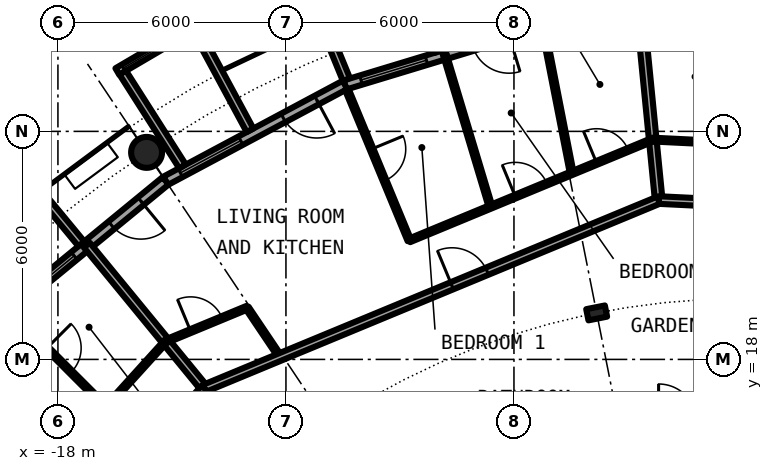
"""IFC4 building model, lengths in metres.
Left out: names, types, materials, properties, quantities, classifications, styles, units other than length and angle.
Written with IfcOpenShell. Run it as: python <this file> out.ifc"""

import sys

from ifc_helpers import new_model, si_unit, direction, frame, frame_2d, origin, origin_2d, place, context, subcontext, project, spatial, rectangle, circle, hollow_circle, i_section, extrude, element, fill, save


model = new_model("IFC4")
c1 = context("Model", 3, precision=1e-05, world=origin(), true_north=direction((0.0, 1.0)))
c2 = subcontext(c1, "Body", "Model", "MODEL_VIEW")
j1 = project(units=[si_unit("LENGTHUNIT", "METRE"), si_unit("PLANEANGLEUNIT", "RADIAN")], contexts=[c1])
p1 = place(None, origin())
s1 = spatial("IfcSite", under=j1, at=p1, CompositionType="ELEMENT")
p2 = place(p1, origin())
s2 = spatial("IfcBuilding", under=s1, at=p2, CompositionType="ELEMENT")
p3 = place(p2, frame((0.0, 0.0, 173.8)))
s3 = spatial("IfcBuildingStorey", under=s2, at=p3, CompositionType="ELEMENT", Elevation=173.8)
p4 = place(p3, frame((-15.667, 23.448, 0.0), z_axis=(0.0, 0.0, 1.0), x_axis=(1.0, 0.0, 0.0)))
e1 = element("IfcColumn", 1, at=p4, inside=s3, PredefinedType="COLUMN", context=c2, shape_type="SweptSolid", body=[
    extrude(hollow_circle(Radius=0.406, WallThickness=0.04, at=origin_2d()), origin(), (0.0, 0.0, 1.0), 3.05),
])
p5 = place(p3, frame((-3.824, 19.223, 0.0), z_axis=(0.0, 0.0, 1.0), x_axis=(-0.195090322016, 0.980785280403, 0.0)))
e2 = element("IfcColumn", 2, at=p5, inside=s3, PredefinedType="COLUMN", context=c2, shape_type="SweptSolid", body=[
    extrude(i_section(OverallWidth=0.3, OverallDepth=0.5, WebThickness=0.014, FlangeThickness=0.028, FilletRadius=0.027, at=origin_2d()), origin(), (0.0, 0.0, 1.0), 3.05),
])
p6 = place(p3, frame((-5.326, 26.775, 0.0), z_axis=(0.0, 0.0, 1.0), x_axis=(-0.956965678721, -0.290201119486, 0.0)))
e3 = element("IfcWall", 3, at=p6, inside=s3, PredefinedType="SOLIDWALL", context=c2, shape_type="SweptSolid", body=[
    extrude(rectangle(XDim=5.351, YDim=0.25, at=frame_2d((2.676, 0.0))), origin(), (0.0, 0.0, 1.0), 2.7),
])
p7 = place(p6, frame((0.841, 0.0, 0.0)))
e4 = element("IfcOpeningElement", 4, at=p7, cuts=e3, PredefinedType="OPENING", context=c2, shape_type="SweptSolid", body=[
    extrude(rectangle(XDim=1.0, YDim=2.2, at=frame_2d((0.5, 1.1))), frame((0.0, 0.135, 0.0), z_axis=(0.0, -1.0, 0.0), x_axis=(1.0, 0.0, 0.0)), (0.0, 0.0, 1.0), 0.27),
])
p8 = place(p6, frame((3.111, 0.0, 0.3)))
e5 = element("IfcOpeningElement", 5, at=p8, cuts=e3, PredefinedType="OPENING", context=c2, shape_type="SweptSolid", body=[
    extrude(rectangle(XDim=1.8, YDim=2.1, at=frame_2d((0.9, 1.05))), frame((0.0, 0.135, 0.0), z_axis=(0.0, -1.0, 0.0), x_axis=(1.0, 0.0, 0.0)), (0.0, 0.0, 1.0), 0.27),
])
p9 = place(p3, frame((-8.009, 26.092, -0.03), z_axis=(0.0, 0.0, 1.0), x_axis=(-0.293406695073, 0.955987715029, 0.0)))
e6 = element("IfcWall", 6, at=p9, inside=s3, PredefinedType="SOLIDWALL", context=c2, shape_type="SweptSolid", body=[
    extrude(rectangle(XDim=3.006, YDim=0.2, at=frame_2d((1.503, 0.0))), origin(), (0.0, 0.0, 1.0), 2.73),
])
p10 = place(p3, frame((-10.409, 25.364, -0.03), z_axis=(0.0, 0.0, 1.0), x_axis=(-0.379509886562, 0.925187681501, 0.0)))
e7 = element("IfcWall", 7, at=p10, inside=s3, PredefinedType="SOLIDWALL", context=c2, shape_type="SweptSolid", body=[
    extrude(rectangle(XDim=2.883, YDim=0.2, at=frame_2d((1.441, 0.0))), origin(), (0.0, 0.0, 1.0), 2.73),
])
p11 = place(p3, frame((-10.447, 25.222, 0.0), z_axis=(0.0, 0.0, 1.0), x_axis=(-0.881915646801, -0.471407246368, 0.0)))
e8 = element("IfcWall", 8, at=p11, inside=s3, PredefinedType="SOLIDWALL", context=c2, shape_type="SweptSolid", body=[
    extrude(rectangle(XDim=5.352, YDim=0.25, at=frame_2d((2.676, 0.0))), origin(), (0.0, 0.0, 1.0), 2.7),
])
p12 = place(p11, frame((0.841, 0.0, 0.0)))
e9 = element("IfcOpeningElement", 9, at=p12, cuts=e8, PredefinedType="OPENING", context=c2, shape_type="SweptSolid", body=[
    extrude(rectangle(XDim=1.0, YDim=2.2, at=frame_2d((0.5, 1.1))), frame((0.0, 0.135, 0.0), z_axis=(0.0, -1.0, 0.0), x_axis=(1.0, 0.0, 0.0)), (0.0, 0.0, 1.0), 0.27),
])
p13 = place(p11, frame((3.111, 0.0, 0.3)))
e10 = element("IfcOpeningElement", 10, at=p13, cuts=e8, PredefinedType="OPENING", context=c2, shape_type="SweptSolid", body=[
    extrude(rectangle(XDim=1.8, YDim=2.1, at=frame_2d((0.9, 1.05))), frame((0.0, 0.135, 0.0), z_axis=(0.0, -1.0, 0.0), x_axis=(1.0, 0.0, 0.0)), (0.0, 0.0, 1.0), 0.27),
])
p14 = place(p3, frame((-14.327, 26.812, -0.03), z_axis=(0.0, 0.0, 1.0), x_axis=(-0.862403467503, -0.506221551535, 0.0)))
e11 = element("IfcWall", 11, at=p14, inside=s3, PredefinedType="SOLIDWALL", context=c2, shape_type="SweptSolid", body=[
    extrude(rectangle(XDim=2.446, YDim=0.2, at=frame_2d((1.223, 0.0))), origin(), (0.0, 0.0, 1.0), 2.73),
])
p15 = place(p14, frame((0.183, 0.0, 0.33)))
e12 = element("IfcOpeningElement", 12, at=p15, cuts=e11, PredefinedType="OPENING", context=c2, shape_type="SweptSolid", body=[
    extrude(circle(Radius=1.04, at=frame_2d((1.04, 1.04))), frame((0.0, 0.11, 0.0), z_axis=(0.0, -1.0, 0.0), x_axis=(1.0, 0.0, 0.0)), (0.0, 0.0, 1.0), 0.22),
])
p16 = place(p3, frame((-12.945, 24.029, -0.03), z_axis=(0.0, 0.0, 1.0), x_axis=(-0.474424310775, 0.88029629861, 0.0)))
e13 = element("IfcWall", 13, at=p16, inside=s3, PredefinedType="SOLIDWALL", context=c2, shape_type="SweptSolid", body=[
    extrude(rectangle(XDim=3.006, YDim=0.2, at=frame_2d((1.503, 0.0))), origin(), (0.0, 0.0, 1.0), 2.73),
])
p17 = place(p3, frame((-14.722, 23.079, -0.03), z_axis=(0.0, 0.0, 1.0), x_axis=(-0.537572179146, 0.843217737129, 0.0)))
e14 = element("IfcWall", 14, at=p17, inside=s3, PredefinedType="SOLIDWALL", context=c2, shape_type="SweptSolid", body=[
    extrude(rectangle(XDim=2.924, YDim=0.2, at=frame_2d((1.462, 0.0))), origin(), (0.0, 0.0, 1.0), 2.73),
])
p18 = place(p3, frame((-15.167, 22.699, 0.0), z_axis=(0.0, 0.0, 1.0), x_axis=(-0.773019449054, -0.634382322723, 0.0)))
e15 = element("IfcWall", 15, at=p18, inside=s3, PredefinedType="SOLIDWALL", context=c2, shape_type="SweptSolid", body=[
    extrude(rectangle(XDim=5.352, YDim=0.25, at=frame_2d((2.676, 0.0))), origin(), (0.0, 0.0, 1.0), 2.7),
])
p19 = place(p18, frame((0.841, 0.0, 0.0)))
e16 = element("IfcOpeningElement", 16, at=p19, cuts=e15, PredefinedType="OPENING", context=c2, shape_type="SweptSolid", body=[
    extrude(rectangle(XDim=1.0, YDim=2.2, at=frame_2d((0.5, 1.1))), frame((0.0, 0.135, 0.0), z_axis=(0.0, -1.0, 0.0), x_axis=(1.0, 0.0, 0.0)), (0.0, 0.0, 1.0), 0.27),
])
p20 = place(p18, frame((3.111, 0.0, 0.3)))
e17 = element("IfcOpeningElement", 17, at=p20, cuts=e15, PredefinedType="OPENING", context=c2, shape_type="SweptSolid", body=[
    extrude(rectangle(XDim=1.8, YDim=2.1, at=frame_2d((0.9, 1.05))), frame((0.0, 0.135, 0.0), z_axis=(0.0, -1.0, 0.0), x_axis=(1.0, 0.0, 0.0)), (0.0, 0.0, 1.0), 0.27),
])
p21 = place(p3, frame((-17.384, 21.041, -0.03), z_axis=(0.0, 0.0, 1.0), x_axis=(-0.63709551667, 0.770784861449, 0.0)))
e18 = element("IfcWall", 18, at=p21, inside=s3, PredefinedType="SOLIDWALL", context=c2, shape_type="SweptSolid", body=[
    extrude(rectangle(XDim=3.006, YDim=0.2, at=frame_2d((1.503, 0.0))), origin(), (0.0, 0.0, 1.0), 2.73),
])
p22 = place(p3, frame((-19.21, 19.222, 0.0), z_axis=(0.0, 0.0, 1.0), x_axis=(0.706967463531, -0.707246071398, 0.0)))
e19 = element("IfcWall", 19, at=p22, inside=s3, PredefinedType="PARTITIONING", context=c2, shape_type="SweptSolid", body=[
    extrude(rectangle(XDim=3.505, YDim=0.1, at=frame_2d((1.752, 0.0))), origin(), (0.0, 0.0, 1.0), 2.7),
])
p23 = place(p22, frame((1.303, 0.0, 0.0)))
e20 = element("IfcOpeningElement", 20, at=p23, cuts=e19, PredefinedType="OPENING", context=c2, shape_type="SweptSolid", body=[
    extrude(rectangle(XDim=0.9, YDim=2.3, at=frame_2d((0.45, 1.15))), frame((0.0, 0.06, 0.0), z_axis=(0.0, -1.0, 0.0), x_axis=(1.0, 0.0, 0.0)), (0.0, 0.0, 1.0), 0.12),
])
p24 = place(p3, frame((-17.24, 21.007, 0.0), z_axis=(0.0, 0.0, 1.0), x_axis=(0.634374159378, -0.773026148273, 0.0)))
e21 = element("IfcWall", 21, at=p24, inside=s3, PredefinedType="PARTITIONING", context=c2, shape_type="SweptSolid", body=[
    extrude(rectangle(XDim=4.876, YDim=0.2, at=frame_2d((2.438, 0.0))), origin(), (0.0, 0.0, 1.0), 2.7),
])
p25 = place(p3, frame((-13.025, 19.36, 0.0), z_axis=(0.0, 0.0, 1.0), x_axis=(0.558121913892, -0.829758958514, 0.0)))
e22 = element("IfcWall", 22, at=p25, inside=s3, PredefinedType="PARTITIONING", context=c2, shape_type="SweptSolid", body=[
    extrude(rectangle(XDim=1.562, YDim=0.1, at=frame_2d((0.781, 0.0))), origin(), (0.0, 0.0, 1.0), 2.7),
])
p26 = place(p3, frame((-10.399, 25.106, 0.0), z_axis=(0.0, 0.0, 1.0), x_axis=(0.382689142274, -0.923877167369, 0.0)))
e23 = element("IfcWall", 23, at=p26, inside=s3, PredefinedType="PARTITIONING", context=c2, shape_type="SweptSolid", body=[
    extrude(rectangle(XDim=4.304, YDim=0.1, at=frame_2d((2.152, 0.0))), origin(), (0.0, 0.0, 1.0), 2.7),
])
p27 = place(p26, frame((1.702, 0.0, 0.0)))
e24 = element("IfcOpeningElement", 24, at=p27, cuts=e23, PredefinedType="OPENING", context=c2, shape_type="SweptSolid", body=[
    extrude(rectangle(XDim=0.9, YDim=2.3, at=frame_2d((0.45, 1.15))), frame((0.0, 0.06, 0.0), z_axis=(0.0, -1.0, 0.0), x_axis=(1.0, 0.0, 0.0)), (0.0, 0.0, 1.0), 0.12),
])
p28 = place(p3, frame((-7.821, 26.025, 0.0), z_axis=(0.0, 0.0, 1.0), x_axis=(0.287802539521, -0.957689771401, 0.0)))
e25 = element("IfcWall", 25, at=p28, inside=s3, PredefinedType="PARTITIONING", context=c2, shape_type="SweptSolid", body=[
    extrude(rectangle(XDim=4.187, YDim=0.1, at=frame_2d((2.094, 0.0))), origin(), (0.0, 0.0, 1.0), 2.7),
])
p29 = place(p3, frame((-5.217, 26.67, 0.0), z_axis=(0.0, 0.0, 1.0), x_axis=(0.192118055779, -0.981371821811, 0.0)))
e26 = element("IfcWall", 26, at=p29, inside=s3, PredefinedType="PARTITIONING", context=c2, shape_type="SweptSolid", body=[
    extrude(rectangle(XDim=3.842, YDim=0.1, at=frame_2d((1.921, 0.0))), origin(), (0.0, 0.0, 1.0), 2.7),
])
p30 = place(p3, frame((-2.67, 27.043, 0.0), z_axis=(0.0, 0.0, 1.0), x_axis=(0.098263949654, -0.995160387173, 0.0)))
e27 = element("IfcWall", 27, at=p30, inside=s3, PredefinedType="PARTITIONING", context=c2, shape_type="SweptSolid", body=[
    extrude(rectangle(XDim=4.875, YDim=0.2, at=frame_2d((2.438, 0.0))), origin(), (0.0, 0.0, 1.0), 2.7),
])
p31 = place(p3, frame((-14.147, 17.238, 0.0), z_axis=(0.0, 0.0, 1.0), x_axis=(0.923860535822, 0.382729291212, 0.0)))
e28 = element("IfcWall", 28, at=p31, inside=s3, PredefinedType="PARTITIONING", context=c2, shape_type="SweptSolid", body=[
    extrude(rectangle(XDim=12.947, YDim=0.2, at=frame_2d((6.473, 0.0))), origin(), (0.0, 0.0, 1.0), 2.7),
])
p32 = place(p31, frame((7.053, 0.0, 0.0)))
e29 = element("IfcOpeningElement", 29, at=p32, cuts=e28, PredefinedType="OPENING", context=c2, shape_type="SweptSolid", body=[
    extrude(rectangle(XDim=1.0, YDim=2.3, at=frame_2d((0.5, 1.15))), frame((0.0, 0.11, 0.0), z_axis=(0.0, -1.0, 0.0), x_axis=(1.0, 0.0, 0.0)), (0.0, 0.0, 1.0), 0.22),
])
p33 = place(p3, frame((-18.542, 12.389, 0.0), z_axis=(0.0, 0.0, 1.0), x_axis=(0.671561669125, 0.740948665268, 0.0)))
e30 = element("IfcWall", 30, at=p33, inside=s3, PredefinedType="PARTITIONING", context=c2, shape_type="SweptSolid", body=[
    extrude(rectangle(XDim=6.544, YDim=0.2, at=frame_2d((3.272, 0.0))), origin(), (0.0, 0.0, 1.0), 2.7),
])
p34 = place(p33, frame((3.862, 0.0, 0.0)))
e31 = element("IfcOpeningElement", 31, at=p34, cuts=e30, PredefinedType="OPENING", context=c2, shape_type="SweptSolid", body=[
    extrude(rectangle(XDim=1.0, YDim=2.3, at=frame_2d((0.5, 1.15))), frame((0.0, 0.11, 0.0), z_axis=(0.0, -1.0, 0.0), x_axis=(1.0, 0.0, 0.0)), (0.0, 0.0, 1.0), 0.22),
])
p35 = place(p3, frame((-2.186, 22.193, 0.0), z_axis=(0.0, 0.0, 1.0), x_axis=(0.998796224858, -0.049052025534, 0.0)))
e32 = element("IfcWall", 32, at=p35, inside=s3, PredefinedType="PARTITIONING", context=c2, shape_type="SweptSolid", body=[
    extrude(rectangle(XDim=6.545, YDim=0.2, at=frame_2d((3.272, 0.0))), origin(), (0.0, 0.0, 1.0), 2.7),
])
p36 = place(p35, frame((1.682, 0.0, 0.0)))
e33 = element("IfcOpeningElement", 33, at=p36, cuts=e32, PredefinedType="OPENING", context=c2, shape_type="SweptSolid", body=[
    extrude(rectangle(XDim=1.0, YDim=2.3, at=frame_2d((0.5, 1.15))), frame((0.0, 0.11, 0.0), z_axis=(0.0, -1.0, 0.0), x_axis=(1.0, 0.0, 0.0)), (0.0, 0.0, 1.0), 0.22),
])
p37 = place(p3, frame((-15.162, 18.475, 0.0), z_axis=(0.0, 0.0, 1.0), x_axis=(0.923917795213, 0.382591044968, 0.0)))
e34 = element("IfcWall", 34, at=p37, inside=s3, PredefinedType="PARTITIONING", context=c2, shape_type="SweptSolid", body=[
    extrude(rectangle(XDim=2.313, YDim=0.1, at=frame_2d((1.157, 0.0))), origin(), (0.0, 0.0, 1.0), 2.7),
])
p38 = place(p37, frame((0.707, 0.0, 0.0)))
e35 = element("IfcOpeningElement", 35, at=p38, cuts=e34, PredefinedType="OPENING", context=c2, shape_type="SweptSolid", body=[
    extrude(rectangle(XDim=0.9, YDim=2.3, at=frame_2d((0.45, 1.15))), frame((0.0, 0.06, 0.0), z_axis=(0.0, -1.0, 0.0), x_axis=(1.0, 0.0, 0.0)), (0.0, 0.0, 1.0), 0.12),
])
p39 = place(p3, frame((-8.75, 21.131, 0.0), z_axis=(0.0, 0.0, 1.0), x_axis=(0.923964526154, 0.382478175075, 0.0)))
e36 = element("IfcWall", 36, at=p39, inside=s3, PredefinedType="PARTITIONING", context=c2, shape_type="SweptSolid", body=[
    extrude(rectangle(XDim=6.938, YDim=0.1, at=frame_2d((3.469, 0.0))), origin(), (0.0, 0.0, 1.0), 2.7),
])
p40 = place(p39, frame((3.015, 0.0, 0.0)))
e37 = element("IfcOpeningElement", 37, at=p40, cuts=e36, PredefinedType="OPENING", context=c2, shape_type="SweptSolid", body=[
    extrude(rectangle(XDim=0.9, YDim=2.3, at=frame_2d((0.45, 1.15))), frame((0.0, 0.06, 0.0), z_axis=(0.0, -1.0, 0.0), x_axis=(1.0, 0.0, 0.0)), (0.0, 0.0, 1.0), 0.12),
])
p41 = place(p39, frame((5.33, 0.0, 0.0)))
e38 = element("IfcOpeningElement", 38, at=p41, cuts=e36, PredefinedType="OPENING", context=c2, shape_type="SweptSolid", body=[
    extrude(rectangle(XDim=0.9, YDim=2.3, at=frame_2d((0.45, 1.15))), frame((0.0, 0.06, 0.0), z_axis=(0.0, -1.0, 0.0), x_axis=(1.0, 0.0, 0.0)), (0.0, 0.0, 1.0), 0.12),
])
for number, where, z_axis, x_axis in (
    (39, (-16.732, 16.743, 0.0), (0.0, 0.0, 1.0), (0.672, 0.741, 0.0)),
    (40, (-2.353, 23.784, 0.0), (0.0, 0.0, 1.0), (0.999, -0.049, 0.0)),
):
    element("IfcWall", number, at=place(p3, frame(where, z_axis=z_axis, x_axis=x_axis)), inside=s3, PredefinedType="PARTITIONING", context=c2, shape_type="SweptSolid", body=[
        extrude(rectangle(XDim=2.338, YDim=0.1, at=frame_2d((1.169, 0.0))), origin(), (0.0, 0.0, 1.0), 2.7),
    ])
p42 = place(p8, origin())
e41 = element("IfcWindow", 41, at=p42, inside=s3, PartitioningType="SINGLE_PANEL", PredefinedType="WINDOW", context=c2, shape_type="SweptSolid", body=[
    extrude(rectangle(XDim=1.8, YDim=2.1, at=frame_2d((0.9, 1.05))), frame((0.0, 0.03, 0.0), z_axis=(0.0, -1.0, 0.0), x_axis=(1.0, 0.0, 0.0)), (0.0, 0.0, 1.0), 0.06),
])
fill(e5, e41)
p43 = place(p12, origin())
e42 = element("IfcDoor", 42, at=p43, inside=s3, OperationType="SINGLE_SWING_LEFT", PredefinedType="DOOR", context=c2, shape_type="SweptSolid", body=[
    extrude(rectangle(XDim=1.0, YDim=2.2, at=frame_2d((0.5, 1.1))), frame((0.0, 0.025, 0.0), z_axis=(0.0, -1.0, 0.0), x_axis=(1.0, 0.0, 0.0)), (0.0, 0.0, 1.0), 0.05),
])
fill(e9, e42)
p44 = place(p13, origin())
e43 = element("IfcWindow", 43, at=p44, inside=s3, PartitioningType="SINGLE_PANEL", PredefinedType="WINDOW", context=c2, shape_type="SweptSolid", body=[
    extrude(rectangle(XDim=1.8, YDim=2.1, at=frame_2d((0.9, 1.05))), frame((0.0, 0.03, 0.0), z_axis=(0.0, -1.0, 0.0), x_axis=(1.0, 0.0, 0.0)), (0.0, 0.0, 1.0), 0.06),
])
fill(e10, e43)
p45 = place(p15, origin())
e44 = element("IfcWindow", 44, at=p45, inside=s3, PartitioningType="SINGLE_PANEL", PredefinedType="WINDOW", context=c2, shape_type="SweptSolid", body=[
    extrude(circle(Radius=1.04, at=frame_2d((1.04, 1.04))), frame((0.0, 0.03, 0.0), z_axis=(0.0, -1.0, 0.0), x_axis=(1.0, 0.0, 0.0)), (0.0, 0.0, 1.0), 0.06),
])
fill(e12, e44)
p46 = place(p19, origin())
e45 = element("IfcDoor", 45, at=p46, inside=s3, OperationType="SINGLE_SWING_LEFT", PredefinedType="DOOR", context=c2, shape_type="SweptSolid", body=[
    extrude(rectangle(XDim=1.0, YDim=2.2, at=frame_2d((0.5, 1.1))), frame((0.0, 0.025, 0.0), z_axis=(0.0, -1.0, 0.0), x_axis=(1.0, 0.0, 0.0)), (0.0, 0.0, 1.0), 0.05),
])
fill(e16, e45)
p47 = place(p20, origin())
e46 = element("IfcWindow", 46, at=p47, inside=s3, PartitioningType="SINGLE_PANEL", PredefinedType="WINDOW", context=c2, shape_type="SweptSolid", body=[
    extrude(rectangle(XDim=1.8, YDim=2.1, at=frame_2d((0.9, 1.05))), frame((0.0, 0.03, 0.0), z_axis=(0.0, -1.0, 0.0), x_axis=(1.0, 0.0, 0.0)), (0.0, 0.0, 1.0), 0.06),
])
fill(e17, e46)
p48 = place(p32, origin())
e47 = element("IfcDoor", 47, at=p48, inside=s3, OperationType="SINGLE_SWING_RIGHT", PredefinedType="DOOR", context=c2, shape_type="SweptSolid", body=[
    extrude(rectangle(XDim=1.0, YDim=2.3, at=frame_2d((0.5, 1.15))), frame((0.0, 0.025, 0.0), z_axis=(0.0, -1.0, 0.0), x_axis=(1.0, 0.0, 0.0)), (0.0, 0.0, 1.0), 0.05),
])
fill(e29, e47)
p49 = place(p38, origin())
e48 = element("IfcDoor", 48, at=p49, inside=s3, OperationType="SINGLE_SWING_LEFT", PredefinedType="DOOR", context=c2, shape_type="SweptSolid", body=[
    extrude(rectangle(XDim=0.9, YDim=2.3, at=frame_2d((0.45, 1.15))), frame((0.0, 0.025, 0.0), z_axis=(0.0, -1.0, 0.0), x_axis=(1.0, 0.0, 0.0)), (0.0, 0.0, 1.0), 0.05),
])
fill(e35, e48)
p50 = place(p27, origin())
e49 = element("IfcDoor", 49, at=p50, inside=s3, OperationType="SINGLE_SWING_LEFT", PredefinedType="DOOR", context=c2, shape_type="SweptSolid", body=[
    extrude(rectangle(XDim=0.9, YDim=2.3, at=frame_2d((0.45, 1.15))), frame((0.0, 0.025, 0.0), z_axis=(0.0, -1.0, 0.0), x_axis=(1.0, 0.0, 0.0)), (0.0, 0.0, 1.0), 0.05),
])
fill(e24, e49)
p51 = place(p40, origin())
e50 = element("IfcDoor", 50, at=p51, inside=s3, OperationType="SINGLE_SWING_LEFT", PredefinedType="DOOR", context=c2, shape_type="SweptSolid", body=[
    extrude(rectangle(XDim=0.9, YDim=2.3, at=frame_2d((0.45, 1.15))), frame((0.0, 0.025, 0.0), z_axis=(0.0, -1.0, 0.0), x_axis=(1.0, 0.0, 0.0)), (0.0, 0.0, 1.0), 0.05),
])
fill(e37, e50)
p52 = place(p41, origin())
e51 = element("IfcDoor", 51, at=p52, inside=s3, OperationType="SINGLE_SWING_RIGHT", PredefinedType="DOOR", context=c2, shape_type="SweptSolid", body=[
    extrude(rectangle(XDim=0.9, YDim=2.3, at=frame_2d((0.45, 1.15))), frame((0.0, 0.025, 0.0), z_axis=(0.0, -1.0, 0.0), x_axis=(1.0, 0.0, 0.0)), (0.0, 0.0, 1.0), 0.05),
])
fill(e38, e51)
p53 = place(p23, origin())
e52 = element("IfcDoor", 52, at=p53, inside=s3, OperationType="SINGLE_SWING_LEFT", PredefinedType="DOOR", context=c2, shape_type="SweptSolid", body=[
    extrude(rectangle(XDim=0.9, YDim=2.3, at=frame_2d((0.45, 1.15))), frame((0.0, 0.025, 0.0), z_axis=(0.0, -1.0, 0.0), x_axis=(1.0, 0.0, 0.0)), (0.0, 0.0, 1.0), 0.05),
])
fill(e20, e52)
save(model, sys.argv[1])
